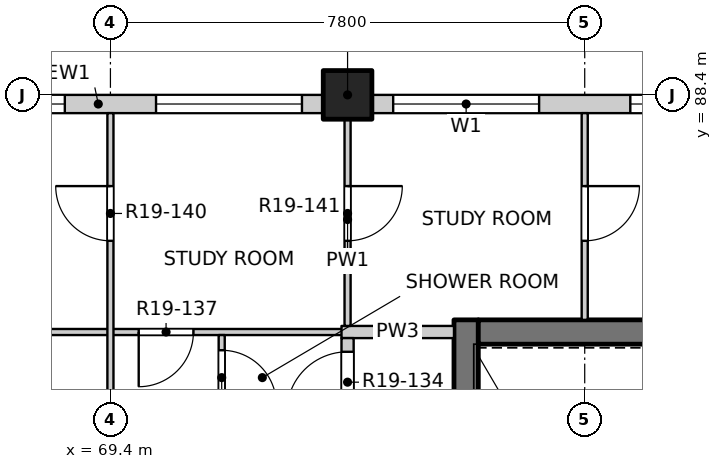
"""IFC4 building model, lengths in metres.
Left out: names, types, materials, properties, quantities, classifications, styles, units other than length and angle.
Written with IfcOpenShell. Run it as: python <this file> out.ifc"""

import sys

from ifc_helpers import new_model, si_unit, direction, frame, frame_2d, origin, origin_2d, place, context, subcontext, project, spatial, rectangle, extrude, element, fill, save


model = new_model("IFC4")
c1 = context("Model", 3, precision=1e-05, world=origin(), true_north=direction((0.0, 1.0)))
c2 = subcontext(c1, "Body", "Model", "MODEL_VIEW")
j1 = project(units=[si_unit("LENGTHUNIT", "METRE"), si_unit("PLANEANGLEUNIT", "RADIAN")], contexts=[c1])
p1 = place(None, origin())
s1 = spatial("IfcSite", under=j1, at=p1, CompositionType="ELEMENT")
p2 = place(p1, origin())
s2 = spatial("IfcBuilding", under=s1, at=p2, CompositionType="ELEMENT")
p3 = place(p2, frame((0.0, 0.0, 197.3)))
s3 = spatial("IfcBuildingStorey", under=s2, at=p3, CompositionType="ELEMENT", Elevation=197.3)
p4 = place(p3, frame((73.3, 88.4, -0.3), z_axis=(0.0, 0.0, 1.0), x_axis=(1.0, 0.0, 0.0)))
e1 = element("IfcColumn", 1, at=p4, inside=s3, PredefinedType="COLUMN", context=c2, shape_type="SweptSolid", body=[
    extrude(rectangle(XDim=0.8, YDim=0.8, at=origin_2d()), origin(), (0.0, 0.0, 1.0), 3.45),
])
p5 = place(p3, frame((75.25, 77.3, -0.3), z_axis=(0.0, 0.0, 1.0), x_axis=(0.0, 1.0, 0.0)))
e2 = element("IfcWall", 2, at=p5, inside=s3, PredefinedType="SOLIDWALL", context=c2, shape_type="SweptSolid", body=[
    extrude(rectangle(XDim=7.4, YDim=0.4, at=frame_2d((3.7, 0.0))), origin(), (0.0, 0.0, 1.0), 3.45),
])
p6 = place(p5, frame((0.3, 0.0, 0.3)))
e3 = element("IfcOpeningElement", 3, at=p6, cuts=e2, PredefinedType="OPENING", context=c2, shape_type="SweptSolid", body=[
    extrude(rectangle(XDim=1.2, YDim=2.1, at=frame_2d((0.6, 1.05))), frame((0.0, 0.21, 0.0), z_axis=(0.0, -1.0, 0.0), x_axis=(1.0, 0.0, 0.0)), (0.0, 0.0, 1.0), 0.42),
])
p7 = place(p3, frame((75.45, 84.5, -0.3), z_axis=(0.0, 0.0, 1.0), x_axis=(1.0, 0.0, 0.0)))
e4 = element("IfcWall", 4, at=p7, inside=s3, PredefinedType="SOLIDWALL", context=c2, shape_type="SweptSolid", body=[
    extrude(rectangle(XDim=19.1, YDim=0.4, at=frame_2d((9.55, 0.0))), origin(), (0.0, 0.0, 1.0), 3.45),
])
p8 = place(p3, frame((65.5, 88.25, 0.0), z_axis=(0.0, 0.0, 1.0), x_axis=(1.0, 0.0, 0.0)))
e5 = element("IfcWall", 5, at=p8, inside=s3, PredefinedType="SOLIDWALL", context=c2, shape_type="SweptSolid", body=[
    extrude(rectangle(XDim=7.4, YDim=0.3, at=frame_2d((3.7, 0.0))), origin(), (0.0, 0.0, 1.0), 2.7),
])
p9 = place(p8, frame((0.75, 0.0, 0.9)))
e6 = element("IfcOpeningElement", 6, at=p9, cuts=e5, PredefinedType="OPENING", context=c2, shape_type="SweptSolid", body=[
    extrude(rectangle(XDim=2.4, YDim=1.8, at=frame_2d((1.2, 0.9))), frame((0.0, 0.16, 0.0), z_axis=(0.0, -1.0, 0.0), x_axis=(1.0, 0.0, 0.0)), (0.0, 0.0, 1.0), 0.32),
])
p10 = place(p8, frame((4.65, 0.0, 0.9)))
e7 = element("IfcOpeningElement", 7, at=p10, cuts=e5, PredefinedType="OPENING", context=c2, shape_type="SweptSolid", body=[
    extrude(rectangle(XDim=2.4, YDim=1.8, at=frame_2d((1.2, 0.9))), frame((0.0, 0.16, 0.0), z_axis=(0.0, -1.0, 0.0), x_axis=(1.0, 0.0, 0.0)), (0.0, 0.0, 1.0), 0.32),
])
p11 = place(p3, frame((73.7, 88.25, 0.0), z_axis=(0.0, 0.0, 1.0), x_axis=(1.0, 0.0, 0.0)))
e8 = element("IfcWall", 8, at=p11, inside=s3, PredefinedType="SOLIDWALL", context=c2, shape_type="SweptSolid", body=[
    extrude(rectangle(XDim=22.6, YDim=0.3, at=frame_2d((11.3, 0.0))), origin(), (0.0, 0.0, 1.0), 2.7),
])
p12 = place(p11, frame((0.35, 0.0, 0.9)))
e9 = element("IfcOpeningElement", 9, at=p12, cuts=e8, PredefinedType="OPENING", context=c2, shape_type="SweptSolid", body=[
    extrude(rectangle(XDim=2.4, YDim=1.8, at=frame_2d((1.2, 0.9))), frame((0.0, 0.16, 0.0), z_axis=(0.0, -1.0, 0.0), x_axis=(1.0, 0.0, 0.0)), (0.0, 0.0, 1.0), 0.32),
])
p13 = place(p11, frame((4.25, 0.0, 0.9)))
e10 = element("IfcOpeningElement", 10, at=p13, cuts=e8, PredefinedType="OPENING", context=c2, shape_type="SweptSolid", body=[
    extrude(rectangle(XDim=2.4, YDim=1.8, at=frame_2d((1.2, 0.9))), frame((0.0, 0.16, 0.0), z_axis=(0.0, -1.0, 0.0), x_axis=(1.0, 0.0, 0.0)), (0.0, 0.0, 1.0), 0.32),
])
p14 = place(p11, frame((8.15, 0.0, 0.9)))
e11 = element("IfcOpeningElement", 11, at=p14, cuts=e8, PredefinedType="OPENING", context=c2, shape_type="SweptSolid", body=[
    extrude(rectangle(XDim=2.4, YDim=1.8, at=frame_2d((1.2, 0.9))), frame((0.0, 0.16, 0.0), z_axis=(0.0, -1.0, 0.0), x_axis=(1.0, 0.0, 0.0)), (0.0, 0.0, 1.0), 0.32),
])
p15 = place(p11, frame((12.05, 0.0, 0.9)))
e12 = element("IfcOpeningElement", 12, at=p15, cuts=e8, PredefinedType="OPENING", context=c2, shape_type="SweptSolid", body=[
    extrude(rectangle(XDim=2.4, YDim=1.8, at=frame_2d((1.2, 0.9))), frame((0.0, 0.16, 0.0), z_axis=(0.0, -1.0, 0.0), x_axis=(1.0, 0.0, 0.0)), (0.0, 0.0, 1.0), 0.32),
])
p16 = place(p11, frame((15.95, 0.0, 0.9)))
e13 = element("IfcOpeningElement", 13, at=p16, cuts=e8, PredefinedType="OPENING", context=c2, shape_type="SweptSolid", body=[
    extrude(rectangle(XDim=2.4, YDim=1.8, at=frame_2d((1.2, 0.9))), frame((0.0, 0.16, 0.0), z_axis=(0.0, -1.0, 0.0), x_axis=(1.0, 0.0, 0.0)), (0.0, 0.0, 1.0), 0.32),
])
p17 = place(p11, frame((19.85, 0.0, 0.9)))
e14 = element("IfcOpeningElement", 14, at=p17, cuts=e8, PredefinedType="OPENING", context=c2, shape_type="SweptSolid", body=[
    extrude(rectangle(XDim=2.4, YDim=1.8, at=frame_2d((1.2, 0.9))), frame((0.0, 0.16, 0.0), z_axis=(0.0, -1.0, 0.0), x_axis=(1.0, 0.0, 0.0)), (0.0, 0.0, 1.0), 0.32),
])
p18 = place(p3, frame((61.9, 84.5, 0.0), z_axis=(0.0, 0.0, 1.0), x_axis=(1.0, 0.0, 0.0)))
e15 = element("IfcWall", 15, at=p18, inside=s3, PredefinedType="PARTITIONING", context=c2, shape_type="SweptSolid", body=[
    extrude(rectangle(XDim=11.5, YDim=0.1, at=frame_2d((5.75, 0.0))), origin(), (0.0, 0.0, 1.0), 3.15),
])
p19 = place(p18, frame((7.965, 0.0, 0.0)))
e16 = element("IfcOpeningElement", 16, at=p19, cuts=e15, PredefinedType="OPENING", context=c2, shape_type="SweptSolid", body=[
    extrude(rectangle(XDim=0.9, YDim=2.1, at=frame_2d((0.45, 1.05))), frame((0.0, 0.06, 0.0), z_axis=(0.0, -1.0, 0.0), x_axis=(1.0, 0.0, 0.0)), (0.0, 0.0, 1.0), 0.12),
])
p20 = place(p3, frame((73.2, 84.5, 0.0), z_axis=(0.0, 0.0, 1.0), x_axis=(1.0, 0.0, 0.0)))
e17 = element("IfcWall", 17, at=p20, inside=s3, PredefinedType="PARTITIONING", context=c2, shape_type="SweptSolid", body=[
    extrude(rectangle(XDim=1.85, YDim=0.2, at=frame_2d((0.925, 0.0))), origin(), (0.0, 0.0, 1.0), 3.15),
])
p21 = place(p3, frame((69.4, 41.9, 0.0), z_axis=(0.0, 0.0, 1.0), x_axis=(0.0, 1.0, 0.0)))
e18 = element("IfcWall", 18, at=p21, inside=s3, PredefinedType="PARTITIONING", context=c2, shape_type="SweptSolid", body=[
    extrude(rectangle(XDim=46.2, YDim=0.1, at=frame_2d((23.1, 0.0))), origin(), (0.0, 0.0, 1.0), 3.15),
])
p22 = place(p21, frame((1.2, 0.0, 0.0)))
e19 = element("IfcOpeningElement", 19, at=p22, cuts=e18, PredefinedType="OPENING", context=c2, shape_type="SweptSolid", body=[
    extrude(rectangle(XDim=0.9, YDim=2.1, at=frame_2d((0.45, 1.05))), frame((0.0, 0.06, 0.0), z_axis=(0.0, -1.0, 0.0), x_axis=(1.0, 0.0, 0.0)), (0.0, 0.0, 1.0), 0.12),
])
p23 = place(p21, frame((5.1, 0.0, 0.0)))
e20 = element("IfcOpeningElement", 20, at=p23, cuts=e18, PredefinedType="OPENING", context=c2, shape_type="SweptSolid", body=[
    extrude(rectangle(XDim=0.9, YDim=2.1, at=frame_2d((0.45, 1.05))), frame((0.0, 0.06, 0.0), z_axis=(0.0, -1.0, 0.0), x_axis=(1.0, 0.0, 0.0)), (0.0, 0.0, 1.0), 0.12),
])
p24 = place(p21, frame((9.0, 0.0, 0.0)))
e21 = element("IfcOpeningElement", 21, at=p24, cuts=e18, PredefinedType="OPENING", context=c2, shape_type="SweptSolid", body=[
    extrude(rectangle(XDim=0.9, YDim=2.1, at=frame_2d((0.45, 1.05))), frame((0.0, 0.06, 0.0), z_axis=(0.0, -1.0, 0.0), x_axis=(1.0, 0.0, 0.0)), (0.0, 0.0, 1.0), 0.12),
])
p25 = place(p21, frame((13.85, 0.0, 0.0)))
e22 = element("IfcOpeningElement", 22, at=p25, cuts=e18, PredefinedType="OPENING", context=c2, shape_type="SweptSolid", body=[
    extrude(rectangle(XDim=0.9, YDim=2.1, at=frame_2d((0.45, 1.05))), frame((0.0, 0.06, 0.0), z_axis=(0.0, -1.0, 0.0), x_axis=(1.0, 0.0, 0.0)), (0.0, 0.0, 1.0), 0.12),
])
p26 = place(p21, frame((17.775, 0.0, 0.0)))
e23 = element("IfcOpeningElement", 23, at=p26, cuts=e18, PredefinedType="OPENING", context=c2, shape_type="SweptSolid", body=[
    extrude(rectangle(XDim=0.9, YDim=2.1, at=frame_2d((0.45, 1.05))), frame((0.0, 0.06, 0.0), z_axis=(0.0, -1.0, 0.0), x_axis=(1.0, 0.0, 0.0)), (0.0, 0.0, 1.0), 0.12),
])
p27 = place(p21, frame((21.625, 0.0, 0.0)))
e24 = element("IfcOpeningElement", 24, at=p27, cuts=e18, PredefinedType="OPENING", context=c2, shape_type="SweptSolid", body=[
    extrude(rectangle(XDim=0.9, YDim=2.1, at=frame_2d((0.45, 1.05))), frame((0.0, 0.06, 0.0), z_axis=(0.0, -1.0, 0.0), x_axis=(1.0, 0.0, 0.0)), (0.0, 0.0, 1.0), 0.12),
])
p28 = place(p21, frame((24.6, 0.0, 0.0)))
e25 = element("IfcOpeningElement", 25, at=p28, cuts=e18, PredefinedType="OPENING", context=c2, shape_type="SweptSolid", body=[
    extrude(rectangle(XDim=0.9, YDim=2.1, at=frame_2d((0.45, 1.05))), frame((0.0, 0.06, 0.0), z_axis=(0.0, -1.0, 0.0), x_axis=(1.0, 0.0, 0.0)), (0.0, 0.0, 1.0), 0.12),
])
p29 = place(p21, frame((29.425, 0.0, 0.0)))
e26 = element("IfcOpeningElement", 26, at=p29, cuts=e18, PredefinedType="OPENING", context=c2, shape_type="SweptSolid", body=[
    extrude(rectangle(XDim=0.9, YDim=2.1, at=frame_2d((0.45, 1.05))), frame((0.0, 0.06, 0.0), z_axis=(0.0, -1.0, 0.0), x_axis=(1.0, 0.0, 0.0)), (0.0, 0.0, 1.0), 0.12),
])
p30 = place(p21, frame((33.375, 0.0, 0.0)))
e27 = element("IfcOpeningElement", 27, at=p30, cuts=e18, PredefinedType="OPENING", context=c2, shape_type="SweptSolid", body=[
    extrude(rectangle(XDim=0.9, YDim=2.1, at=frame_2d((0.45, 1.05))), frame((0.0, 0.06, 0.0), z_axis=(0.0, -1.0, 0.0), x_axis=(1.0, 0.0, 0.0)), (0.0, 0.0, 1.0), 0.12),
])
p31 = place(p21, frame((37.225, 0.0, 0.0)))
e28 = element("IfcOpeningElement", 28, at=p31, cuts=e18, PredefinedType="OPENING", context=c2, shape_type="SweptSolid", body=[
    extrude(rectangle(XDim=0.9, YDim=2.1, at=frame_2d((0.45, 1.05))), frame((0.0, 0.06, 0.0), z_axis=(0.0, -1.0, 0.0), x_axis=(1.0, 0.0, 0.0)), (0.0, 0.0, 1.0), 0.12),
])
p32 = place(p21, frame((40.2, 0.0, 0.0)))
e29 = element("IfcOpeningElement", 29, at=p32, cuts=e18, PredefinedType="OPENING", context=c2, shape_type="SweptSolid", body=[
    extrude(rectangle(XDim=0.9, YDim=2.1, at=frame_2d((0.45, 1.05))), frame((0.0, 0.06, 0.0), z_axis=(0.0, -1.0, 0.0), x_axis=(1.0, 0.0, 0.0)), (0.0, 0.0, 1.0), 0.12),
])
p33 = place(p21, frame((44.1, 0.0, 0.0)))
e30 = element("IfcOpeningElement", 30, at=p33, cuts=e18, PredefinedType="OPENING", context=c2, shape_type="SweptSolid", body=[
    extrude(rectangle(XDim=0.9, YDim=2.1, at=frame_2d((0.45, 1.05))), frame((0.0, 0.06, 0.0), z_axis=(0.0, -1.0, 0.0), x_axis=(1.0, 0.0, 0.0)), (0.0, 0.0, 1.0), 0.12),
])
p34 = place(p3, frame((71.23, 83.05, 0.0), z_axis=(0.0, 0.0, 1.0), x_axis=(0.0, 1.0, 0.0)))
e31 = element("IfcWall", 31, at=p34, inside=s3, PredefinedType="PARTITIONING", context=c2, shape_type="SweptSolid", body=[
    extrude(rectangle(XDim=1.4, YDim=0.1, at=frame_2d((0.7, 0.0))), origin(), (0.0, 0.0, 1.0), 3.15),
])
p35 = place(p34, frame((0.25, 0.0, 0.0)))
e32 = element("IfcOpeningElement", 32, at=p35, cuts=e31, PredefinedType="OPENING", context=c2, shape_type="SweptSolid", body=[
    extrude(rectangle(XDim=0.9, YDim=2.1, at=frame_2d((0.45, 1.05))), frame((0.0, 0.06, 0.0), z_axis=(0.0, -1.0, 0.0), x_axis=(1.0, 0.0, 0.0)), (0.0, 0.0, 1.0), 0.12),
])
p36 = place(p3, frame((73.3, 49.5, 0.0), z_axis=(0.0, 0.0, 1.0), x_axis=(0.0, 1.0, 0.0)))
e33 = element("IfcWall", 33, at=p36, inside=s3, PredefinedType="PARTITIONING", context=c2, shape_type="SweptSolid", body=[
    extrude(rectangle(XDim=34.9, YDim=0.2, at=frame_2d((17.45, 0.0))), origin(), (0.0, 0.0, 1.0), 3.15),
])
p37 = place(p36, frame((9.725, 0.0, 0.0)))
e34 = element("IfcOpeningElement", 34, at=p37, cuts=e33, PredefinedType="OPENING", context=c2, shape_type="SweptSolid", body=[
    extrude(rectangle(XDim=1.0, YDim=2.1, at=frame_2d((0.5, 1.05))), frame((0.0, 0.11, 0.0), z_axis=(0.0, -1.0, 0.0), x_axis=(1.0, 0.0, 0.0)), (0.0, 0.0, 1.0), 0.22),
])
p38 = place(p36, frame((17.925, 0.0, 0.0)))
e35 = element("IfcOpeningElement", 35, at=p38, cuts=e33, PredefinedType="OPENING", context=c2, shape_type="SweptSolid", body=[
    extrude(rectangle(XDim=1.0, YDim=2.1, at=frame_2d((0.5, 1.05))), frame((0.0, 0.11, 0.0), z_axis=(0.0, -1.0, 0.0), x_axis=(1.0, 0.0, 0.0)), (0.0, 0.0, 1.0), 0.22),
])
p39 = place(p36, frame((33.675, 0.0, 0.0)))
e36 = element("IfcOpeningElement", 36, at=p39, cuts=e33, PredefinedType="OPENING", context=c2, shape_type="SweptSolid", body=[
    extrude(rectangle(XDim=1.0, YDim=2.1, at=frame_2d((0.5, 1.05))), frame((0.0, 0.11, 0.0), z_axis=(0.0, -1.0, 0.0), x_axis=(1.0, 0.0, 0.0)), (0.0, 0.0, 1.0), 0.22),
])
p40 = place(p3, frame((73.3, 84.6, 0.0), z_axis=(0.0, 0.0, 1.0), x_axis=(0.0, 1.0, 0.0)))
e37 = element("IfcWall", 37, at=p40, inside=s3, PredefinedType="PARTITIONING", context=c2, shape_type="SweptSolid", body=[
    extrude(rectangle(XDim=3.5, YDim=0.1, at=frame_2d((1.75, 0.0))), origin(), (0.0, 0.0, 1.0), 3.15),
])
p41 = place(p40, frame((1.4, 0.0, 0.0)))
e38 = element("IfcOpeningElement", 38, at=p41, cuts=e37, PredefinedType="OPENING", context=c2, shape_type="SweptSolid", body=[
    extrude(rectangle(XDim=0.9, YDim=2.1, at=frame_2d((0.45, 1.05))), frame((0.0, 0.06, 0.0), z_axis=(0.0, -1.0, 0.0), x_axis=(1.0, 0.0, 0.0)), (0.0, 0.0, 1.0), 0.12),
])
p42 = place(p3, frame((77.2, 84.7, 0.0), z_axis=(0.0, 0.0, 1.0), x_axis=(0.0, 1.0, 0.0)))
e39 = element("IfcWall", 39, at=p42, inside=s3, PredefinedType="PARTITIONING", context=c2, shape_type="SweptSolid", body=[
    extrude(rectangle(XDim=3.4, YDim=0.1, at=frame_2d((1.7, 0.0))), origin(), (0.0, 0.0, 1.0), 3.15),
])
p43 = place(p42, frame((1.3, 0.0, 0.0)))
e40 = element("IfcOpeningElement", 40, at=p43, cuts=e39, PredefinedType="OPENING", context=c2, shape_type="SweptSolid", body=[
    extrude(rectangle(XDim=0.9, YDim=2.1, at=frame_2d((0.45, 1.05))), frame((0.0, 0.06, 0.0), z_axis=(0.0, -1.0, 0.0), x_axis=(1.0, 0.0, 0.0)), (0.0, 0.0, 1.0), 0.12),
])
p44 = place(p9, origin())
e41 = element("IfcWindow", 41, at=p44, inside=s3, PartitioningType="DOUBLE_PANEL_VERTICAL", PredefinedType="WINDOW", context=c2, shape_type="SweptSolid", body=[
    extrude(rectangle(XDim=2.4, YDim=1.8, at=frame_2d((1.2, 0.9))), frame((0.0, 0.03, 0.0), z_axis=(0.0, -1.0, 0.0), x_axis=(1.0, 0.0, 0.0)), (0.0, 0.0, 1.0), 0.06),
])
fill(e6, e41)
p45 = place(p10, origin())
e42 = element("IfcWindow", 42, at=p45, inside=s3, PartitioningType="DOUBLE_PANEL_VERTICAL", PredefinedType="WINDOW", context=c2, shape_type="SweptSolid", body=[
    extrude(rectangle(XDim=2.4, YDim=1.8, at=frame_2d((1.2, 0.9))), frame((0.0, 0.03, 0.0), z_axis=(0.0, -1.0, 0.0), x_axis=(1.0, 0.0, 0.0)), (0.0, 0.0, 1.0), 0.06),
])
fill(e7, e42)
p46 = place(p12, origin())
e43 = element("IfcWindow", 43, at=p46, inside=s3, PartitioningType="DOUBLE_PANEL_VERTICAL", PredefinedType="WINDOW", context=c2, shape_type="SweptSolid", body=[
    extrude(rectangle(XDim=2.4, YDim=1.8, at=frame_2d((1.2, 0.9))), frame((0.0, 0.03, 0.0), z_axis=(0.0, -1.0, 0.0), x_axis=(1.0, 0.0, 0.0)), (0.0, 0.0, 1.0), 0.06),
])
fill(e9, e43)
p47 = place(p13, origin())
e44 = element("IfcWindow", 44, at=p47, inside=s3, PartitioningType="DOUBLE_PANEL_VERTICAL", PredefinedType="WINDOW", context=c2, shape_type="SweptSolid", body=[
    extrude(rectangle(XDim=2.4, YDim=1.8, at=frame_2d((1.2, 0.9))), frame((0.0, 0.03, 0.0), z_axis=(0.0, -1.0, 0.0), x_axis=(1.0, 0.0, 0.0)), (0.0, 0.0, 1.0), 0.06),
])
fill(e10, e44)
p48 = place(p39, origin())
e45 = element("IfcDoor", 45, at=p48, inside=s3, OperationType="SINGLE_SWING_RIGHT", PredefinedType="DOOR", context=c2, shape_type="SweptSolid", body=[
    extrude(rectangle(XDim=1.0, YDim=2.1, at=frame_2d((0.5, 1.05))), frame((0.0, 0.025, 0.0), z_axis=(0.0, -1.0, 0.0), x_axis=(1.0, 0.0, 0.0)), (0.0, 0.0, 1.0), 0.05),
])
fill(e36, e45)
p49 = place(p35, origin())
e46 = element("IfcDoor", 46, at=p49, inside=s3, OperationType="SINGLE_SWING_RIGHT", PredefinedType="DOOR", context=c2, shape_type="SweptSolid", body=[
    extrude(rectangle(XDim=0.9, YDim=2.1, at=frame_2d((0.45, 1.05))), frame((0.0, 0.025, 0.0), z_axis=(0.0, -1.0, 0.0), x_axis=(1.0, 0.0, 0.0)), (0.0, 0.0, 1.0), 0.05),
])
fill(e32, e46)
p50 = place(p19, origin())
e47 = element("IfcDoor", 47, at=p50, inside=s3, OperationType="SINGLE_SWING_RIGHT", PredefinedType="DOOR", context=c2, shape_type="SweptSolid", body=[
    extrude(rectangle(XDim=0.9, YDim=2.1, at=frame_2d((0.45, 1.05))), frame((0.0, 0.025, 0.0), z_axis=(0.0, -1.0, 0.0), x_axis=(1.0, 0.0, 0.0)), (0.0, 0.0, 1.0), 0.05),
])
fill(e16, e47)
p51 = place(p33, origin())
e48 = element("IfcDoor", 48, at=p51, inside=s3, OperationType="SINGLE_SWING_RIGHT", PredefinedType="DOOR", context=c2, shape_type="SweptSolid", body=[
    extrude(rectangle(XDim=0.9, YDim=2.1, at=frame_2d((0.45, 1.05))), frame((0.0, 0.025, 0.0), z_axis=(0.0, -1.0, 0.0), x_axis=(1.0, 0.0, 0.0)), (0.0, 0.0, 1.0), 0.05),
])
fill(e30, e48)
p52 = place(p41, origin())
e49 = element("IfcDoor", 49, at=p52, inside=s3, OperationType="SINGLE_SWING_LEFT", PredefinedType="DOOR", context=c2, shape_type="SweptSolid", body=[
    extrude(rectangle(XDim=0.9, YDim=2.1, at=frame_2d((0.45, 1.05))), frame((0.0, 0.025, 0.0), z_axis=(0.0, -1.0, 0.0), x_axis=(1.0, 0.0, 0.0)), (0.0, 0.0, 1.0), 0.05),
])
fill(e38, e49)
p53 = place(p43, origin())
e50 = element("IfcDoor", 50, at=p53, inside=s3, OperationType="SINGLE_SWING_LEFT", PredefinedType="DOOR", context=c2, shape_type="SweptSolid", body=[
    extrude(rectangle(XDim=0.9, YDim=2.1, at=frame_2d((0.45, 1.05))), frame((0.0, 0.025, 0.0), z_axis=(0.0, -1.0, 0.0), x_axis=(1.0, 0.0, 0.0)), (0.0, 0.0, 1.0), 0.05),
])
fill(e40, e50)
save(model, sys.argv[1])
